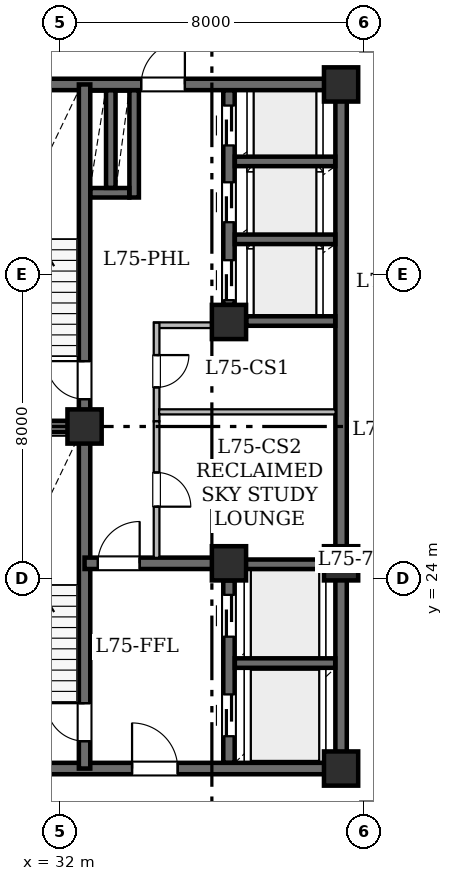
"""IFC4 building model, lengths in metres.
Left out: names, types, materials, properties, quantities, classifications, styles, units other than length and angle.
Written with IfcOpenShell. Run it as: python <this file> out.ifc"""

import sys

from ifc_helpers import new_model, si_unit, direction, frame, frame_2d, origin, origin_2d, place, context, subcontext, project, spatial, rectangle, hollow_rectangle, extrude, element, fill, save


model = new_model("IFC4")
c1 = context("Model", 3, precision=1e-05, world=origin(), true_north=direction((0.0, 1.0)))
c2 = subcontext(c1, "Body", "Model", "MODEL_VIEW")
j1 = project(units=[si_unit("LENGTHUNIT", "METRE"), si_unit("PLANEANGLEUNIT", "RADIAN")], contexts=[c1])
p1 = place(None, origin())
s1 = spatial("IfcSite", under=j1, at=p1, CompositionType="ELEMENT")
p2 = place(p1, origin())
s2 = spatial("IfcBuilding", under=s1, at=p2, CompositionType="ELEMENT")
p3 = place(p2, frame((0.0, 0.0, 294.65)))
s3 = spatial("IfcBuildingStorey", under=s2, at=p3, CompositionType="ELEMENT", Elevation=294.65)
for number, where, z_axis, x_axis in (
    (1, (32.65, 28.0, 0.0), (0.0, 0.0, 1.0), (1.0, 0.0, 0.0)),
    (2, (39.4, 19.0, 0.0), (0.0, 0.0, 1.0), (1.0, 0.0, 0.0)),
    (3, (36.45, 24.4, 0.0), (0.0, 0.0, 1.0), (1.0, 0.0, 0.0)),
    (4, (39.4, 24.4, 0.0), (0.0, 0.0, 1.0), (1.0, 0.0, 0.0)),
    (5, (36.45, 30.75, 0.0), (0.0, 0.0, 1.0), (1.0, 0.0, 0.0)),
    (6, (39.4, 37.0, 0.0), (0.0, 0.0, 1.0), (1.0, 0.0, 0.0)),
):
    element("IfcColumn", number, at=place(p3, frame(where, z_axis=z_axis, x_axis=x_axis)), inside=s3, PredefinedType="COLUMN", context=c2, shape_type="SweptSolid", body=[
        extrude(hollow_rectangle(XDim=0.9, YDim=0.9, WallThickness=0.045, at=origin_2d()), origin(), (0.0, 0.0, 1.0), 4.2),
    ])
p4 = place(p3, frame((29.0, 19.0, 0.0), z_axis=(0.0, 0.0, 1.0), x_axis=(1.0, 0.0, 0.0)))
e7 = element("IfcWall", 7, at=p4, inside=s3, PredefinedType="SHEAR", context=c2, shape_type="SweptSolid", body=[
    extrude(rectangle(XDim=10.4, YDim=0.3, at=frame_2d((5.2, 0.0))), origin(), (0.0, 0.0, 1.0), 3.95),
])
p5 = place(p4, frame((4.9, 0.0, 0.0)))
e8 = element("IfcOpeningElement", 8, at=p5, cuts=e7, PredefinedType="OPENING", context=c2, shape_type="SweptSolid", body=[
    extrude(rectangle(XDim=1.2, YDim=2.15, at=frame_2d((0.6, 1.075))), frame((0.0, 0.16, 0.0), z_axis=(0.0, -1.0, 0.0), x_axis=(1.0, 0.0, 0.0)), (0.0, 0.0, 1.0), 0.32),
])
p6 = place(p3, frame((29.0, 37.0, 0.0), z_axis=(0.0, 0.0, 1.0), x_axis=(1.0, 0.0, 0.0)))
e9 = element("IfcWall", 9, at=p6, inside=s3, PredefinedType="SHEAR", context=c2, shape_type="SweptSolid", body=[
    extrude(rectangle(XDim=10.4, YDim=0.3, at=frame_2d((5.2, 0.0))), origin(), (0.0, 0.0, 1.0), 3.95),
])
p7 = place(p6, frame((5.14, 0.0, 0.0)))
e10 = element("IfcOpeningElement", 10, at=p7, cuts=e9, PredefinedType="OPENING", context=c2, shape_type="SweptSolid", body=[
    extrude(rectangle(XDim=1.15, YDim=2.2, at=frame_2d((0.575, 1.1))), frame((0.0, 0.16, 0.0), z_axis=(0.0, -1.0, 0.0), x_axis=(1.0, 0.0, 0.0)), (0.0, 0.0, 1.0), 0.32),
])
p8 = place(p3, frame((39.4, 19.0, 0.0), z_axis=(0.0, 0.0, 1.0), x_axis=(0.0, 1.0, 0.0)))
e11 = element("IfcWall", 11, at=p8, inside=s3, PredefinedType="SHEAR", context=c2, shape_type="SweptSolid", body=[
    extrude(rectangle(XDim=5.4, YDim=0.3, at=frame_2d((2.7, 0.0))), origin(), (0.0, 0.0, 1.0), 3.95),
])
p9 = place(p3, frame((39.4, 24.4, 0.0), z_axis=(0.0, 0.0, 1.0), x_axis=(0.0, 1.0, 0.0)))
e12 = element("IfcWall", 12, at=p9, inside=s3, PredefinedType="SHEAR", context=c2, shape_type="SweptSolid", body=[
    extrude(rectangle(XDim=12.6, YDim=0.3, at=frame_2d((6.3, 0.0))), origin(), (0.0, 0.0, 1.0), 3.95),
])
p10 = place(p3, frame((32.65, 19.0, 0.0), z_axis=(0.0, 0.0, 1.0), x_axis=(0.0, 1.0, 0.0)))
e13 = element("IfcWall", 13, at=p10, inside=s3, PredefinedType="SHEAR", context=c2, shape_type="SweptSolid", body=[
    extrude(rectangle(XDim=9.0, YDim=0.3, at=frame_2d((4.5, 0.0))), origin(), (0.0, 0.0, 1.0), 3.95),
])
p11 = place(p10, frame((0.72, 0.0, 0.0)))
e14 = element("IfcOpeningElement", 14, at=p11, cuts=e13, PredefinedType="OPENING", context=c2, shape_type="SweptSolid", body=[
    extrude(rectangle(XDim=1.0, YDim=2.15, at=frame_2d((0.5, 1.075))), frame((0.0, 0.16, 0.0), z_axis=(0.0, -1.0, 0.0), x_axis=(1.0, 0.0, 0.0)), (0.0, 0.0, 1.0), 0.32),
])
p12 = place(p3, frame((32.65, 28.0, 0.0), z_axis=(0.0, 0.0, 1.0), x_axis=(0.0, 1.0, 0.0)))
e15 = element("IfcWall", 15, at=p12, inside=s3, PredefinedType="SHEAR", context=c2, shape_type="SweptSolid", body=[
    extrude(rectangle(XDim=9.0, YDim=0.3, at=frame_2d((4.5, 0.0))), origin(), (0.0, 0.0, 1.0), 3.95),
])
p13 = place(p12, frame((0.72, 0.0, 0.0)))
e16 = element("IfcOpeningElement", 16, at=p13, cuts=e15, PredefinedType="OPENING", context=c2, shape_type="SweptSolid", body=[
    extrude(rectangle(XDim=1.0, YDim=2.15, at=frame_2d((0.5, 1.075))), frame((0.0, 0.16, 0.0), z_axis=(0.0, -1.0, 0.0), x_axis=(1.0, 0.0, 0.0)), (0.0, 0.0, 1.0), 0.32),
])
p14 = place(p3, frame((29.0, 28.0, 0.0), z_axis=(0.0, 0.0, 1.0), x_axis=(1.0, 0.0, 0.0)))
e17 = element("IfcWall", 17, at=p14, inside=s3, PredefinedType="SHEAR", context=c2, shape_type="SweptSolid", body=[
    extrude(rectangle(XDim=3.65, YDim=0.3, at=frame_2d((1.825, 0.0))), origin(), (0.0, 0.0, 1.0), 3.95),
])
p15 = place(p3, frame((32.65, 24.4, 0.0), z_axis=(0.0, 0.0, 1.0), x_axis=(1.0, 0.0, 0.0)))
e18 = element("IfcWall", 18, at=p15, inside=s3, PredefinedType="SHEAR", context=c2, shape_type="SweptSolid", body=[
    extrude(rectangle(XDim=3.8, YDim=0.3, at=frame_2d((1.9, 0.0))), origin(), (0.0, 0.0, 1.0), 3.95),
])
p16 = place(p15, frame((0.35, 0.0, 0.0)))
e19 = element("IfcOpeningElement", 19, at=p16, cuts=e18, PredefinedType="OPENING", context=c2, shape_type="SweptSolid", body=[
    extrude(rectangle(XDim=1.1, YDim=2.15, at=frame_2d((0.55, 1.075))), frame((0.0, 0.16, 0.0), z_axis=(0.0, -1.0, 0.0), x_axis=(1.0, 0.0, 0.0)), (0.0, 0.0, 1.0), 0.32),
])
p17 = place(p3, frame((36.45, 19.154, 0.0), z_axis=(0.0, 0.0, 1.0), x_axis=(0.0, 1.0, 0.0)))
e20 = element("IfcWall", 20, at=p17, inside=s3, PredefinedType="SHEAR", context=c2, shape_type="SweptSolid", body=[
    extrude(rectangle(XDim=4.796, YDim=0.3, at=frame_2d((2.398, 0.0))), origin(), (0.0, 0.0, 1.0), 3.95),
])
p18 = place(p17, frame((0.696, 0.0, 0.0)))
e21 = element("IfcOpeningElement", 21, at=p18, cuts=e20, PredefinedType="OPENING", context=c2, shape_type="SweptSolid", body=[
    extrude(rectangle(XDim=1.1, YDim=2.15, at=frame_2d((0.55, 1.075))), frame((0.0, 0.16, 0.0), z_axis=(0.0, -1.0, 0.0), x_axis=(1.0, 0.0, 0.0)), (0.0, 0.0, 1.0), 0.32),
])
p19 = place(p17, frame((3.316, 0.0, 0.0)))
e22 = element("IfcOpeningElement", 22, at=p19, cuts=e20, PredefinedType="OPENING", context=c2, shape_type="SweptSolid", body=[
    extrude(rectangle(XDim=1.1, YDim=2.15, at=frame_2d((0.55, 1.075))), frame((0.0, 0.16, 0.0), z_axis=(0.0, -1.0, 0.0), x_axis=(1.0, 0.0, 0.0)), (0.0, 0.0, 1.0), 0.32),
])
p20 = place(p3, frame((36.45, 31.2, 0.0), z_axis=(0.0, 0.0, 1.0), x_axis=(0.0, 1.0, 0.0)))
e23 = element("IfcWall", 23, at=p20, inside=s3, PredefinedType="SHEAR", context=c2, shape_type="SweptSolid", body=[
    extrude(rectangle(XDim=5.646, YDim=0.3, at=frame_2d((2.823, 0.0))), origin(), (0.0, 0.0, 1.0), 3.95),
])
p21 = place(p20, frame((0.125, 0.0, 0.0)))
e24 = element("IfcOpeningElement", 24, at=p21, cuts=e23, PredefinedType="OPENING", context=c2, shape_type="SweptSolid", body=[
    extrude(rectangle(XDim=1.05, YDim=2.15, at=frame_2d((0.525, 1.075))), frame((0.0, 0.16, 0.0), z_axis=(0.0, -1.0, 0.0), x_axis=(1.0, 0.0, 0.0)), (0.0, 0.0, 1.0), 0.32),
])
p22 = place(p20, frame((2.175, 0.0, 0.0)))
e25 = element("IfcOpeningElement", 25, at=p22, cuts=e23, PredefinedType="OPENING", context=c2, shape_type="SweptSolid", body=[
    extrude(rectangle(XDim=1.05, YDim=2.15, at=frame_2d((0.525, 1.075))), frame((0.0, 0.16, 0.0), z_axis=(0.0, -1.0, 0.0), x_axis=(1.0, 0.0, 0.0)), (0.0, 0.0, 1.0), 0.32),
])
p23 = place(p20, frame((4.195, 0.0, 0.0)))
e26 = element("IfcOpeningElement", 26, at=p23, cuts=e23, PredefinedType="OPENING", context=c2, shape_type="SweptSolid", body=[
    extrude(rectangle(XDim=1.05, YDim=2.15, at=frame_2d((0.525, 1.075))), frame((0.0, 0.16, 0.0), z_axis=(0.0, -1.0, 0.0), x_axis=(1.0, 0.0, 0.0)), (0.0, 0.0, 1.0), 0.32),
])
for number, where, z_axis, x_axis in (
    (27, (36.604, 21.775, 0.0), (0.0, 0.0, 1.0), (1.0, 0.0, 0.0)),
    (28, (36.604, 24.375, 0.0), (0.0, 0.0, 1.0), (1.0, 0.0, 0.0)),
):
    element("IfcWall", number, at=place(p3, frame(where, z_axis=z_axis, x_axis=x_axis)), inside=s3, PredefinedType="SHEAR", context=c2, shape_type="SweptSolid", body=[
        extrude(rectangle(XDim=2.642, YDim=0.25, at=frame_2d((1.321, 0.0))), origin(), (0.0, 0.0, 1.0), 3.95),
    ])
p24 = place(p3, frame((36.904, 30.775, 0.0), z_axis=(0.0, 0.0, 1.0), x_axis=(1.0, 0.0, 0.0)))
e29 = element("IfcWall", 29, at=p24, inside=s3, PredefinedType="SHEAR", context=c2, shape_type="SweptSolid", body=[
    extrude(rectangle(XDim=2.342, YDim=0.25, at=frame_2d((1.171, 0.0))), origin(), (0.0, 0.0, 1.0), 3.95),
])
for number, where, z_axis, x_axis in (
    (30, (36.604, 32.925, 0.0), (0.0, 0.0, 1.0), (1.0, 0.0, 0.0)),
    (31, (36.604, 34.975, 0.0), (0.0, 0.0, 1.0), (1.0, 0.0, 0.0)),
):
    element("IfcWall", number, at=place(p3, frame(where, z_axis=z_axis, x_axis=x_axis)), inside=s3, PredefinedType="SHEAR", context=c2, shape_type="SweptSolid", body=[
        extrude(rectangle(XDim=2.642, YDim=0.25, at=frame_2d((1.321, 0.0))), origin(), (0.0, 0.0, 1.0), 3.95),
    ])
p25 = place(p3, frame((33.955, 34.025, 0.0), z_axis=(0.0, 0.0, 1.0), x_axis=(0.0, 1.0, 0.0)))
e32 = element("IfcWall", 32, at=p25, inside=s3, PredefinedType="SHEAR", context=c2, shape_type="SweptSolid", body=[
    extrude(rectangle(XDim=2.821, YDim=0.25, at=frame_2d((1.411, 0.0))), origin(), (0.0, 0.0, 1.0), 3.95),
])
p26 = place(p3, frame((32.804, 34.15, 0.0), z_axis=(0.0, 0.0, 1.0), x_axis=(1.0, 0.0, 0.0)))
e33 = element("IfcWall", 33, at=p26, inside=s3, PredefinedType="SHEAR", context=c2, shape_type="SweptSolid", body=[
    extrude(rectangle(XDim=1.022, YDim=0.25, at=frame_2d((0.511, 0.0))), origin(), (0.0, 0.0, 1.0), 3.95),
])
p27 = place(p3, frame((33.34, 34.279, 0.0), z_axis=(0.0, 0.0, 1.0), x_axis=(0.0, 1.0, 0.0)))
e34 = element("IfcWall", 34, at=p27, inside=s3, PredefinedType="SHEAR", context=c2, shape_type="SweptSolid", body=[
    extrude(rectangle(XDim=2.567, YDim=0.25, at=frame_2d((1.283, 0.0))), origin(), (0.0, 0.0, 1.0), 3.95),
])
p28 = place(p3, frame((36.3, 30.665, 0.0), z_axis=(0.0, 0.0, 1.0), x_axis=(-1.0, 0.0, 0.0)))
e35 = element("IfcWall", 35, at=p28, inside=s3, PredefinedType="STANDARD", context=c2, shape_type="SweptSolid", body=[
    extrude(rectangle(XDim=1.82, YDim=0.15, at=frame_2d((0.91, 0.0))), origin(), (0.0, 0.0, 1.0), 3.95),
])
p29 = place(p3, frame((34.545, 30.73, 0.0), z_axis=(0.0, 0.0, 1.0), x_axis=(0.0, -1.0, 0.0)))
e36 = element("IfcWall", 36, at=p29, inside=s3, PredefinedType="STANDARD", context=c2, shape_type="SweptSolid", body=[
    extrude(rectangle(XDim=2.594, YDim=0.15, at=frame_2d((1.297, 0.0))), origin(), (0.0, 0.0, 1.0), 3.95),
])
p30 = place(p29, frame((0.851, 0.0, 0.0)))
e37 = element("IfcOpeningElement", 37, at=p30, cuts=e36, PredefinedType="OPENING", context=c2, shape_type="SweptSolid", body=[
    extrude(rectangle(XDim=0.85, YDim=2.1, at=frame_2d((0.425, 1.05))), frame((0.0, 0.085, 0.0), z_axis=(0.0, -1.0, 0.0), x_axis=(1.0, 0.0, 0.0)), (0.0, 0.0, 1.0), 0.17),
])
p31 = place(p3, frame((34.545, 28.136, 0.0), z_axis=(0.0, 0.0, 1.0), x_axis=(0.0, -1.0, 0.0)))
e38 = element("IfcWall", 38, at=p31, inside=s3, PredefinedType="STANDARD", context=c2, shape_type="SweptSolid", body=[
    extrude(rectangle(XDim=3.592, YDim=0.15, at=frame_2d((1.796, 0.0))), origin(), (0.0, 0.0, 1.0), 3.95),
])
p32 = place(p31, frame((1.346, 0.0, 0.0)))
e39 = element("IfcOpeningElement", 39, at=p32, cuts=e38, PredefinedType="OPENING", context=c2, shape_type="SweptSolid", body=[
    extrude(rectangle(XDim=0.9, YDim=2.1, at=frame_2d((0.45, 1.05))), frame((0.0, 0.085, 0.0), z_axis=(0.0, -1.0, 0.0), x_axis=(1.0, 0.0, 0.0)), (0.0, 0.0, 1.0), 0.17),
])
p33 = place(p3, frame((39.256, 28.385, 0.0), z_axis=(0.0, 0.0, 1.0), x_axis=(-1.0, 0.0, 0.0)))
e40 = element("IfcWall", 40, at=p33, inside=s3, PredefinedType="PARTITIONING", context=c2, shape_type="SweptSolid", body=[
    extrude(rectangle(XDim=4.644, YDim=0.135, at=frame_2d((2.322, 0.0))), origin(), (0.0, 0.0, 1.0), 3.95),
])
p34 = place(p11, origin())
e41 = element("IfcDoor", 41, at=p34, inside=s3, OperationType="SINGLE_SWING_RIGHT", PredefinedType="DOOR", context=c2, shape_type="SweptSolid", body=[
    extrude(rectangle(XDim=1.0, YDim=2.15, at=frame_2d((0.5, 1.075))), frame((0.0, 0.025, 0.0), z_axis=(0.0, -1.0, 0.0), x_axis=(1.0, 0.0, 0.0)), (0.0, 0.0, 1.0), 0.05),
])
fill(e14, e41)
p35 = place(p13, origin())
e42 = element("IfcDoor", 42, at=p35, inside=s3, OperationType="SINGLE_SWING_RIGHT", PredefinedType="DOOR", context=c2, shape_type="SweptSolid", body=[
    extrude(rectangle(XDim=1.0, YDim=2.15, at=frame_2d((0.5, 1.075))), frame((0.0, 0.025, 0.0), z_axis=(0.0, -1.0, 0.0), x_axis=(1.0, 0.0, 0.0)), (0.0, 0.0, 1.0), 0.05),
])
fill(e16, e42)
p36 = place(p16, origin())
e43 = element("IfcDoor", 43, at=p36, inside=s3, OperationType="SINGLE_SWING_RIGHT", PredefinedType="DOOR", context=c2, shape_type="SweptSolid", body=[
    extrude(rectangle(XDim=1.1, YDim=2.15, at=frame_2d((0.55, 1.075))), frame((0.0, 0.025, 0.0), z_axis=(0.0, -1.0, 0.0), x_axis=(1.0, 0.0, 0.0)), (0.0, 0.0, 1.0), 0.05),
])
fill(e19, e43)
p37 = place(p5, origin())
e44 = element("IfcDoor", 44, at=p37, inside=s3, OperationType="SINGLE_SWING_LEFT", PredefinedType="DOOR", context=c2, shape_type="SweptSolid", body=[
    extrude(rectangle(XDim=1.2, YDim=2.15, at=frame_2d((0.6, 1.075))), frame((0.0, 0.025, 0.0), z_axis=(0.0, -1.0, 0.0), x_axis=(1.0, 0.0, 0.0)), (0.0, 0.0, 1.0), 0.05),
])
fill(e8, e44)
p38 = place(p7, origin())
e45 = element("IfcDoor", 45, at=p38, inside=s3, OperationType="SINGLE_SWING_RIGHT", PredefinedType="DOOR", context=c2, shape_type="SweptSolid", body=[
    extrude(rectangle(XDim=1.15, YDim=2.2, at=frame_2d((0.575, 1.1))), frame((0.0, 0.025, 0.0), z_axis=(0.0, -1.0, 0.0), x_axis=(1.0, 0.0, 0.0)), (0.0, 0.0, 1.0), 0.05),
])
fill(e10, e45)
p39 = place(p18, origin())
e46 = element("IfcDoor", 46, at=p39, inside=s3, OperationType="SLIDING_TO_LEFT", PredefinedType="DOOR", context=c2, shape_type="SweptSolid", body=[
    extrude(rectangle(XDim=1.1, YDim=2.15, at=frame_2d((0.55, 1.075))), frame((0.0, 0.025, 0.0), z_axis=(0.0, -1.0, 0.0), x_axis=(1.0, 0.0, 0.0)), (0.0, 0.0, 1.0), 0.05),
])
fill(e21, e46)
p40 = place(p19, origin())
e47 = element("IfcDoor", 47, at=p40, inside=s3, OperationType="SLIDING_TO_LEFT", PredefinedType="DOOR", context=c2, shape_type="SweptSolid", body=[
    extrude(rectangle(XDim=1.1, YDim=2.15, at=frame_2d((0.55, 1.075))), frame((0.0, 0.025, 0.0), z_axis=(0.0, -1.0, 0.0), x_axis=(1.0, 0.0, 0.0)), (0.0, 0.0, 1.0), 0.05),
])
fill(e22, e47)
p41 = place(p21, origin())
e48 = element("IfcDoor", 48, at=p41, inside=s3, OperationType="SLIDING_TO_LEFT", PredefinedType="DOOR", context=c2, shape_type="SweptSolid", body=[
    extrude(rectangle(XDim=1.05, YDim=2.15, at=frame_2d((0.525, 1.075))), frame((0.0, 0.025, 0.0), z_axis=(0.0, -1.0, 0.0), x_axis=(1.0, 0.0, 0.0)), (0.0, 0.0, 1.0), 0.05),
])
fill(e24, e48)
p42 = place(p22, origin())
e49 = element("IfcDoor", 49, at=p42, inside=s3, OperationType="SLIDING_TO_LEFT", PredefinedType="DOOR", context=c2, shape_type="SweptSolid", body=[
    extrude(rectangle(XDim=1.05, YDim=2.15, at=frame_2d((0.525, 1.075))), frame((0.0, 0.025, 0.0), z_axis=(0.0, -1.0, 0.0), x_axis=(1.0, 0.0, 0.0)), (0.0, 0.0, 1.0), 0.05),
])
fill(e25, e49)
p43 = place(p23, origin())
e50 = element("IfcDoor", 50, at=p43, inside=s3, OperationType="SLIDING_TO_LEFT", PredefinedType="DOOR", context=c2, shape_type="SweptSolid", body=[
    extrude(rectangle(XDim=1.05, YDim=2.15, at=frame_2d((0.525, 1.075))), frame((0.0, 0.025, 0.0), z_axis=(0.0, -1.0, 0.0), x_axis=(1.0, 0.0, 0.0)), (0.0, 0.0, 1.0), 0.05),
])
fill(e26, e50)
p44 = place(p30, origin())
e51 = element("IfcDoor", 51, at=p44, inside=s3, OperationType="SINGLE_SWING_LEFT", PredefinedType="DOOR", context=c2, shape_type="SweptSolid", body=[
    extrude(rectangle(XDim=0.85, YDim=2.1, at=frame_2d((0.425, 1.05))), frame((0.0, 0.025, 0.0), z_axis=(0.0, -1.0, 0.0), x_axis=(1.0, 0.0, 0.0)), (0.0, 0.0, 1.0), 0.05),
])
fill(e37, e51)
p45 = place(p32, origin())
e52 = element("IfcDoor", 52, at=p45, inside=s3, OperationType="SINGLE_SWING_RIGHT", PredefinedType="DOOR", context=c2, shape_type="SweptSolid", body=[
    extrude(rectangle(XDim=0.9, YDim=2.1, at=frame_2d((0.45, 1.05))), frame((0.0, 0.025, 0.0), z_axis=(0.0, -1.0, 0.0), x_axis=(1.0, 0.0, 0.0)), (0.0, 0.0, 1.0), 0.05),
])
fill(e39, e52)
save(model, sys.argv[1])
